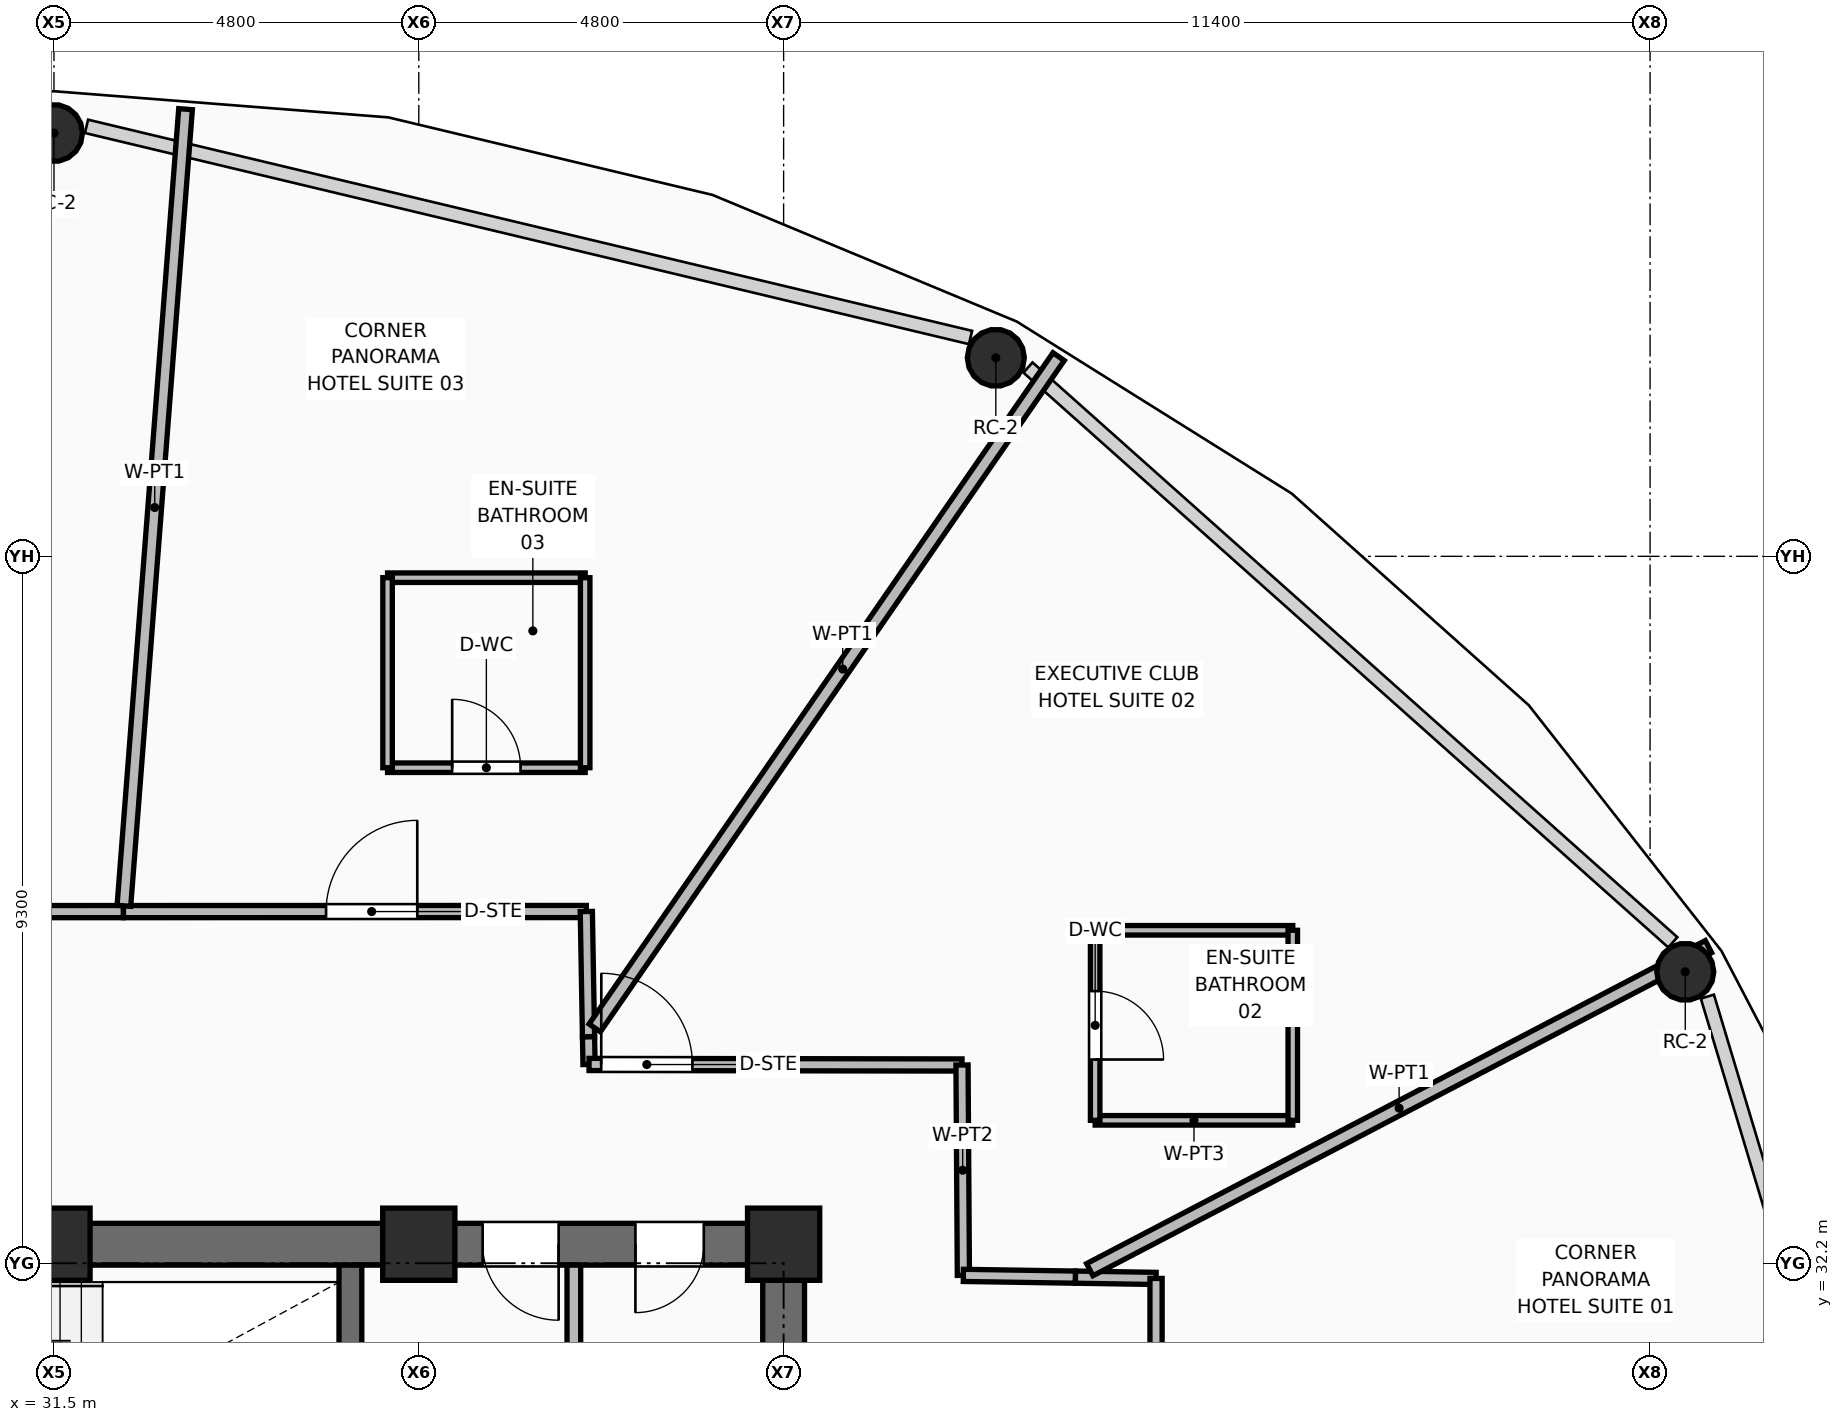
"""IFC4 building model, lengths in metres.
Left out: names, types, materials, properties, quantities, classifications, styles, units other than length and angle.
Written with IfcOpenShell. Run it as: python <this file> out.ifc"""

import sys

from ifc_helpers import new_model, si_unit, direction, frame, frame_2d, origin, origin_2d, place, context, subcontext, project, spatial, rectangle, hollow_circle, extrude, element, fill, save


model = new_model("IFC4")
c1 = context("Model", 3, precision=1e-05, world=origin(), true_north=direction((0.0, 1.0)))
c2 = subcontext(c1, "Body", "Model", "MODEL_VIEW")
j1 = project(units=[si_unit("LENGTHUNIT", "METRE"), si_unit("PLANEANGLEUNIT", "RADIAN")], contexts=[c1])
p1 = place(None, origin())
s1 = spatial("IfcSite", under=j1, at=p1, CompositionType="ELEMENT")
p2 = place(p1, origin())
s2 = spatial("IfcBuilding", under=s1, at=p2, CompositionType="ELEMENT")
p3 = place(p2, frame((0.0, 0.0, 149.7)))
s3 = spatial("IfcBuildingStorey", under=s2, at=p3, CompositionType="ELEMENT", Elevation=149.7)
for number, where, z_axis, x_axis in (
    (1, (31.5, 32.45, 0.0), (0.0, 0.0, 1.0), (1.0, 0.0, 0.0)),
    (2, (36.3, 32.45, 0.0), (0.0, 0.0, 1.0), (1.0, 0.0, 0.0)),
    (3, (41.1, 32.45, 0.0), (0.0, 0.0, 1.0), (1.0, 0.0, 0.0)),
):
    element("IfcColumn", number, at=place(p3, frame(where, z_axis=z_axis, x_axis=x_axis)), inside=s3, PredefinedType="COLUMN", context=c2, shape_type="SweptSolid", body=[
        extrude(rectangle(XDim=0.95, YDim=0.95, at=origin_2d()), origin(), (0.0, 0.0, 1.0), 3.75),
    ])
for number, where, z_axis, x_axis in (
    (4, (52.963, 36.034, 0.0), (0.0, 0.0, 1.0), (1.0, 0.0, 0.0)),
    (5, (43.892, 44.112, 0.0), (0.0, 0.0, 1.0), (1.0, 0.0, 0.0)),
    (6, (31.5, 47.069, 0.0), (0.0, 0.0, 1.0), (1.0, 0.0, 0.0)),
):
    element("IfcColumn", number, at=place(p3, frame(where, z_axis=z_axis, x_axis=x_axis)), inside=s3, PredefinedType="COLUMN", context=c2, shape_type="SweptSolid", body=[
        extrude(hollow_circle(Radius=0.375, WallThickness=0.035, at=origin_2d()), origin(), (0.0, 0.0, 1.0), 3.57),
    ])
p4 = place(p3, frame((21.625, 32.45, 0.0), z_axis=(0.0, 0.0, 1.0), x_axis=(1.0, 0.0, 0.0)))
e7 = element("IfcWall", 7, at=p4, inside=s3, PredefinedType="SHEAR", context=c2, shape_type="SweptSolid", body=[
    extrude(rectangle(XDim=19.75, YDim=0.55, at=frame_2d((9.875, 0.0))), origin(), (0.0, 0.0, 1.0), 3.57),
])
p5 = place(p4, frame((2.125, 0.0, 0.0)))
e8 = element("IfcOpeningElement", 8, at=p5, cuts=e7, PredefinedType="OPENING", context=c2, shape_type="SweptSolid", body=[
    extrude(rectangle(XDim=1.1, YDim=2.1, at=frame_2d((0.55, 1.05))), frame((0.0, 0.285, 0.0), z_axis=(0.0, -1.0, 0.0), x_axis=(1.0, 0.0, 0.0)), (0.0, 0.0, 1.0), 0.57),
])
p6 = place(p4, frame((15.515, 0.0, 0.0)))
e9 = element("IfcOpeningElement", 9, at=p6, cuts=e7, PredefinedType="OPENING", context=c2, shape_type="SweptSolid", body=[
    extrude(rectangle(XDim=1.0, YDim=2.1, at=frame_2d((0.5, 1.05))), frame((0.0, 0.285, 0.0), z_axis=(0.0, -1.0, 0.0), x_axis=(1.0, 0.0, 0.0)), (0.0, 0.0, 1.0), 0.57),
])
p7 = place(p4, frame((17.525, 0.0, 0.0)))
e10 = element("IfcOpeningElement", 10, at=p7, cuts=e7, PredefinedType="OPENING", context=c2, shape_type="SweptSolid", body=[
    extrude(rectangle(XDim=0.9, YDim=2.1, at=frame_2d((0.45, 1.05))), frame((0.0, 0.285, 0.0), z_axis=(0.0, -1.0, 0.0), x_axis=(1.0, 0.0, 0.0)), (0.0, 0.0, 1.0), 0.57),
])
p8 = place(p3, frame((41.1, 18.075, 0.0), z_axis=(0.0, 0.0, 1.0), x_axis=(0.0, 1.0, 0.0)))
e11 = element("IfcWall", 11, at=p8, inside=s3, PredefinedType="SHEAR", context=c2, shape_type="SweptSolid", body=[
    extrude(rectangle(XDim=14.1, YDim=0.55, at=frame_2d((7.05, 0.0))), origin(), (0.0, 0.0, 1.0), 3.57),
])
p9 = place(p8, frame((3.385, 0.0, 0.0)))
e12 = element("IfcOpeningElement", 12, at=p9, cuts=e11, PredefinedType="OPENING", context=c2, shape_type="SweptSolid", body=[
    extrude(rectangle(XDim=1.05, YDim=2.1, at=frame_2d((0.525, 1.05))), frame((0.0, 0.285, 0.0), z_axis=(0.0, -1.0, 0.0), x_axis=(1.0, 0.0, 0.0)), (0.0, 0.0, 1.0), 0.57),
])
p10 = place(p3, frame((35.4, 28.75, 0.0), z_axis=(0.0, 0.0, 1.0), x_axis=(0.0, 1.0, 0.0)))
e13 = element("IfcWall", 13, at=p10, inside=s3, PredefinedType="SHEAR", context=c2, shape_type="SweptSolid", body=[
    extrude(rectangle(XDim=3.425, YDim=0.3, at=frame_2d((1.712, 0.0))), origin(), (0.0, 0.0, 1.0), 3.57),
])
p11 = place(p3, frame((38.34, 28.62, 0.0), z_axis=(0.0, 0.0, 1.0), x_axis=(0.0, 1.0, 0.0)))
e14 = element("IfcWall", 14, at=p11, inside=s3, PredefinedType="PARTITIONING", context=c2, shape_type="SweptSolid", body=[
    extrude(rectangle(XDim=3.555, YDim=0.18, at=frame_2d((1.777, 0.0))), origin(), (0.0, 0.0, 1.0), 3.55),
])
p12 = place(p3, frame((25.678, 36.825, 0.0), z_axis=(0.0, 0.0, 1.0), x_axis=(0.999999989491, 0.000144974809, 0.0)))
e15 = element("IfcWall", 15, at=p12, inside=s3, PredefinedType="PARTITIONING", context=c2, shape_type="SweptSolid", body=[
    extrude(rectangle(XDim=6.736, YDim=0.16, at=frame_2d((3.368, 0.0))), origin(), (0.0, 0.0, 1.0), 3.006),
])
p13 = place(p12, frame((2.843, 0.0, 0.0)))
e16 = element("IfcOpeningElement", 16, at=p13, cuts=e15, PredefinedType="OPENING", context=c2, shape_type="SweptSolid", body=[
    extrude(rectangle(XDim=1.2, YDim=2.1, at=frame_2d((0.6, 1.05))), frame((0.0, 0.09, 0.0), z_axis=(0.0, -1.0, 0.0), x_axis=(1.0, 0.0, 0.0)), (0.0, 0.0, 1.0), 0.18),
])
p14 = place(p3, frame((32.414, 36.826, 0.0), z_axis=(0.0, 0.0, 1.0), x_axis=(0.999999987142, 0.000160359203, 0.0)))
e17 = element("IfcWall", 17, at=p14, inside=s3, PredefinedType="PARTITIONING", context=c2, shape_type="SweptSolid", body=[
    extrude(rectangle(XDim=6.09, YDim=0.16, at=frame_2d((3.045, 0.0))), origin(), (0.0, 0.0, 1.0), 3.55),
])
p15 = place(p14, frame((2.666, 0.0, 0.0)))
e18 = element("IfcOpeningElement", 18, at=p15, cuts=e17, PredefinedType="OPENING", context=c2, shape_type="SweptSolid", body=[
    extrude(rectangle(XDim=1.2, YDim=2.1, at=frame_2d((0.6, 1.05))), frame((0.0, 0.09, 0.0), z_axis=(0.0, -1.0, 0.0), x_axis=(1.0, 0.0, 0.0)), (0.0, 0.0, 1.0), 0.18),
])
p16 = place(p3, frame((38.504, 36.827, 0.0), z_axis=(0.0, 0.0, 1.0), x_axis=(0.017616454452, -0.999844818226, 0.0)))
e19 = element("IfcWall", 19, at=p16, inside=s3, PredefinedType="PARTITIONING", context=c2, shape_type="SweptSolid", body=[
    extrude(rectangle(XDim=1.649, YDim=0.16, at=frame_2d((0.825, 0.0))), origin(), (0.0, 0.0, 1.0), 3.55),
])
p17 = place(p3, frame((38.533, 35.178, 0.0), z_axis=(0.0, 0.0, 1.0), x_axis=(0.01949864601, -0.99980988333, 0.0)))
e20 = element("IfcWall", 20, at=p17, inside=s3, PredefinedType="PARTITIONING", context=c2, shape_type="SweptSolid", body=[
    extrude(rectangle(XDim=0.363, YDim=0.16, at=frame_2d((0.182, 0.0))), origin(), (0.0, 0.0, 1.0), 3.55),
])
p18 = place(p3, frame((38.54, 34.815, 0.0), z_axis=(0.0, 0.0, 1.0), x_axis=(0.999999029632, -0.001393102783, 0.0)))
e21 = element("IfcWall", 21, at=p18, inside=s3, PredefinedType="PARTITIONING", context=c2, shape_type="SweptSolid", body=[
    extrude(rectangle(XDim=4.907, YDim=0.16, at=frame_2d((2.454, 0.0))), origin(), (0.0, 0.0, 1.0), 3.006),
])
p19 = place(p18, frame((0.16, 0.0, 0.0)))
e22 = element("IfcOpeningElement", 22, at=p19, cuts=e21, PredefinedType="OPENING", context=c2, shape_type="SweptSolid", body=[
    extrude(rectangle(XDim=1.2, YDim=2.1, at=frame_2d((0.6, 1.05))), frame((0.0, 0.09, 0.0), z_axis=(0.0, -1.0, 0.0), x_axis=(1.0, 0.0, 0.0)), (0.0, 0.0, 1.0), 0.18),
])
p20 = place(p3, frame((43.447, 34.808, 0.0), z_axis=(0.0, 0.0, 1.0), x_axis=(0.006526585281, -0.999978701615, 0.0)))
e23 = element("IfcWall", 23, at=p20, inside=s3, PredefinedType="PARTITIONING", context=c2, shape_type="SweptSolid", body=[
    extrude(rectangle(XDim=2.768, YDim=0.16, at=frame_2d((1.384, 0.0))), origin(), (0.0, 0.0, 1.0), 3.006),
])
p21 = place(p3, frame((43.465, 32.04, 0.0), z_axis=(0.0, 0.0, 1.0), x_axis=(0.999878959925, -0.015558454268, 0.0)))
e24 = element("IfcWall", 24, at=p21, inside=s3, PredefinedType="PARTITIONING", context=c2, shape_type="SweptSolid", body=[
    extrude(rectangle(XDim=1.475, YDim=0.16, at=frame_2d((0.738, 0.0))), origin(), (0.0, 0.0, 1.0), 3.55),
])
p22 = place(p3, frame((44.94, 32.017, 0.0), z_axis=(0.0, 0.0, 1.0), x_axis=(0.999870072285, -0.016119508305, 0.0)))
e25 = element("IfcWall", 25, at=p22, inside=s3, PredefinedType="PARTITIONING", context=c2, shape_type="SweptSolid", body=[
    extrude(rectangle(XDim=1.06, YDim=0.16, at=frame_2d((0.53, 0.0))), origin(), (0.0, 0.0, 1.0), 3.55),
])
p23 = place(p3, frame((46.0, 32.0, 0.0), z_axis=(0.0, 0.0, 1.0), x_axis=(0.0, -1.0, 0.0)))
e26 = element("IfcWall", 26, at=p23, inside=s3, PredefinedType="PARTITIONING", context=c2, shape_type="SweptSolid", body=[
    extrude(rectangle(XDim=6.313, YDim=0.16, at=frame_2d((3.156, 0.0))), origin(), (0.0, 0.0, 1.0), 3.55),
])
p24 = place(p23, frame((2.407, 0.0, 0.0)))
e27 = element("IfcOpeningElement", 27, at=p24, cuts=e26, PredefinedType="OPENING", context=c2, shape_type="SweptSolid", body=[
    extrude(rectangle(XDim=1.2, YDim=2.1, at=frame_2d((0.6, 1.05))), frame((0.0, 0.09, 0.0), z_axis=(0.0, -1.0, 0.0), x_axis=(1.0, 0.0, 0.0)), (0.0, 0.0, 1.0), 0.18),
])
p25 = place(p3, frame((45.128, 32.115, 0.0), z_axis=(0.0, 0.0, 1.0), x_axis=(0.886452073938, 0.46282039779, 0.0)))
e28 = element("IfcWall", 28, at=p25, inside=s3, PredefinedType="PARTITIONING", context=c2, shape_type="SweptSolid", body=[
    extrude(rectangle(XDim=9.183, YDim=0.18, at=frame_2d((4.591, 0.0))), origin(), (0.0, 0.0, 1.0), 2.852),
])
p26 = place(p3, frame((38.615, 35.296, 0.0), z_axis=(0.0, 0.0, 1.0), x_axis=(0.568530950042, 0.822661873946, 0.0)))
e29 = element("IfcWall", 29, at=p26, inside=s3, PredefinedType="PARTITIONING", context=c2, shape_type="SweptSolid", body=[
    extrude(rectangle(XDim=10.735, YDim=0.18, at=frame_2d((5.367, 0.0))), origin(), (0.0, 0.0, 1.0), 2.852),
])
p27 = place(p3, frame((32.42, 36.902, 0.0), z_axis=(0.0, 0.0, 1.0), x_axis=(0.077151140833, 0.997019408772, 0.0)))
e30 = element("IfcWall", 30, at=p27, inside=s3, PredefinedType="PARTITIONING", context=c2, shape_type="SweptSolid", body=[
    extrude(rectangle(XDim=10.512, YDim=0.18, at=frame_2d((5.256, 0.0))), origin(), (0.0, 0.0, 1.0), 2.852),
])
p28 = place(p3, frame((45.199, 34.08, 0.0), z_axis=(0.0, 0.0, 1.0), x_axis=(1.0, 0.0, 0.0)))
e31 = element("IfcWall", 31, at=p28, inside=s3, PredefinedType="PARTITIONING", context=c2, shape_type="SweptSolid", body=[
    extrude(rectangle(XDim=2.6, YDim=0.125, at=frame_2d((1.3, 0.0))), origin(), (0.0, 0.0, 1.0), 3.006),
])
p29 = place(p3, frame((45.199, 36.58, 0.0), z_axis=(0.0, 0.0, 1.0), x_axis=(1.0, 0.0, 0.0)))
e32 = element("IfcWall", 32, at=p29, inside=s3, PredefinedType="PARTITIONING", context=c2, shape_type="SweptSolid", body=[
    extrude(rectangle(XDim=2.6, YDim=0.125, at=frame_2d((1.3, 0.0))), origin(), (0.0, 0.0, 1.0), 3.55),
])
p30 = place(p3, frame((45.199, 34.08, 0.0), z_axis=(0.0, 0.0, 1.0), x_axis=(0.0, 1.0, 0.0)))
e33 = element("IfcWall", 33, at=p30, inside=s3, PredefinedType="PARTITIONING", context=c2, shape_type="SweptSolid", body=[
    extrude(rectangle(XDim=2.5, YDim=0.125, at=frame_2d((1.25, 0.0))), origin(), (0.0, 0.0, 1.0), 3.55),
])
p31 = place(p30, frame((0.8, 0.0, 0.0)))
e34 = element("IfcOpeningElement", 34, at=p31, cuts=e33, PredefinedType="OPENING", context=c2, shape_type="SweptSolid", body=[
    extrude(rectangle(XDim=0.9, YDim=2.1, at=frame_2d((0.45, 1.05))), frame((0.0, 0.073, 0.0), z_axis=(0.0, -1.0, 0.0), x_axis=(1.0, 0.0, 0.0)), (0.0, 0.0, 1.0), 0.145),
])
p32 = place(p3, frame((47.799, 34.08, 0.0), z_axis=(0.0, 0.0, 1.0), x_axis=(0.0, 1.0, 0.0)))
e35 = element("IfcWall", 35, at=p32, inside=s3, PredefinedType="PARTITIONING", context=c2, shape_type="SweptSolid", body=[
    extrude(rectangle(XDim=2.5, YDim=0.125, at=frame_2d((1.25, 0.0))), origin(), (0.0, 0.0, 1.0), 3.006),
])
p33 = place(p3, frame((35.889, 38.719, 0.0), z_axis=(0.0, 0.0, 1.0), x_axis=(1.0, 0.0, 0.0)))
e36 = element("IfcWall", 36, at=p33, inside=s3, PredefinedType="PARTITIONING", context=c2, shape_type="SweptSolid", body=[
    extrude(rectangle(XDim=2.6, YDim=0.125, at=frame_2d((1.3, 0.0))), origin(), (0.0, 0.0, 1.0), 3.55),
])
p34 = place(p33, frame((0.85, 0.0, 0.0)))
e37 = element("IfcOpeningElement", 37, at=p34, cuts=e36, PredefinedType="OPENING", context=c2, shape_type="SweptSolid", body=[
    extrude(rectangle(XDim=0.9, YDim=2.1, at=frame_2d((0.45, 1.05))), frame((0.0, 0.073, 0.0), z_axis=(0.0, -1.0, 0.0), x_axis=(1.0, 0.0, 0.0)), (0.0, 0.0, 1.0), 0.145),
])
p35 = place(p3, frame((35.889, 41.219, 0.0), z_axis=(0.0, 0.0, 1.0), x_axis=(1.0, 0.0, 0.0)))
e38 = element("IfcWall", 38, at=p35, inside=s3, PredefinedType="PARTITIONING", context=c2, shape_type="SweptSolid", body=[
    extrude(rectangle(XDim=2.6, YDim=0.125, at=frame_2d((1.3, 0.0))), origin(), (0.0, 0.0, 1.0), 3.55),
])
for number, where, z_axis, x_axis in (
    (39, (35.889, 38.719, 0.0), (0.0, 0.0, 1.0), (0.0, 1.0, 0.0)),
    (40, (38.489, 38.719, 0.0), (0.0, 0.0, 1.0), (0.0, 1.0, 0.0)),
):
    element("IfcWall", number, at=place(p3, frame(where, z_axis=z_axis, x_axis=x_axis)), inside=s3, PredefinedType="PARTITIONING", context=c2, shape_type="SweptSolid", body=[
        extrude(rectangle(XDim=2.5, YDim=0.125, at=frame_2d((1.25, 0.0))), origin(), (0.0, 0.0, 1.0), 3.55),
    ])
p36 = place(p6, frame((1.0, 0.0, 0.0), z_axis=(0.0, 0.0, 1.0), x_axis=(-1.0, 0.0, 0.0)))
e41 = element("IfcDoor", 41, at=p36, inside=s3, OperationType="SINGLE_SWING_LEFT", PredefinedType="DOOR", context=c2, shape_type="SweptSolid", body=[
    extrude(rectangle(XDim=1.0, YDim=2.1, at=frame_2d((0.5, 1.05))), frame((0.0, 0.025, 0.0), z_axis=(0.0, -1.0, 0.0), x_axis=(1.0, 0.0, 0.0)), (0.0, 0.0, 1.0), 0.05),
])
fill(e9, e41)
p37 = place(p7, frame((0.9, 0.0, 0.0), z_axis=(0.0, 0.0, 1.0), x_axis=(-1.0, 0.0, 0.0)))
e42 = element("IfcDoor", 42, at=p37, inside=s3, OperationType="SINGLE_SWING_RIGHT", PredefinedType="DOOR", context=c2, shape_type="SweptSolid", body=[
    extrude(rectangle(XDim=0.9, YDim=2.1, at=frame_2d((0.45, 1.05))), frame((0.0, 0.025, 0.0), z_axis=(0.0, -1.0, 0.0), x_axis=(1.0, 0.0, 0.0)), (0.0, 0.0, 1.0), 0.05),
])
fill(e10, e42)
p38 = place(p31, frame((0.9, 0.0, 0.0), z_axis=(0.0, 0.0, 1.0), x_axis=(-1.0, 0.0, 0.0)))
e43 = element("IfcDoor", 43, at=p38, inside=s3, OperationType="SINGLE_SWING_RIGHT", PredefinedType="DOOR", context=c2, shape_type="SweptSolid", body=[
    extrude(rectangle(XDim=0.9, YDim=2.1, at=frame_2d((0.45, 1.05))), frame((0.0, 0.025, 0.0), z_axis=(0.0, -1.0, 0.0), x_axis=(1.0, 0.0, 0.0)), (0.0, 0.0, 1.0), 0.05),
])
fill(e34, e43)
p39 = place(p19, origin())
e44 = element("IfcDoor", 44, at=p39, inside=s3, OperationType="SINGLE_SWING_LEFT", PredefinedType="DOOR", context=c2, shape_type="SweptSolid", body=[
    extrude(rectangle(XDim=1.2, YDim=2.1, at=frame_2d((0.6, 1.05))), frame((0.0, 0.025, 0.0), z_axis=(0.0, -1.0, 0.0), x_axis=(1.0, 0.0, 0.0)), (0.0, 0.0, 1.0), 0.05),
])
fill(e22, e44)
p40 = place(p34, origin())
e45 = element("IfcDoor", 45, at=p40, inside=s3, OperationType="SINGLE_SWING_LEFT", PredefinedType="DOOR", context=c2, shape_type="SweptSolid", body=[
    extrude(rectangle(XDim=0.9, YDim=2.1, at=frame_2d((0.45, 1.05))), frame((0.0, 0.025, 0.0), z_axis=(0.0, -1.0, 0.0), x_axis=(1.0, 0.0, 0.0)), (0.0, 0.0, 1.0), 0.05),
])
fill(e37, e45)
p41 = place(p15, origin())
e46 = element("IfcDoor", 46, at=p41, inside=s3, OperationType="SINGLE_SWING_RIGHT", PredefinedType="DOOR", context=c2, shape_type="SweptSolid", body=[
    extrude(rectangle(XDim=1.2, YDim=2.1, at=frame_2d((0.6, 1.05))), frame((0.0, 0.025, 0.0), z_axis=(0.0, -1.0, 0.0), x_axis=(1.0, 0.0, 0.0)), (0.0, 0.0, 1.0), 0.05),
])
fill(e18, e46)
save(model, sys.argv[1])
